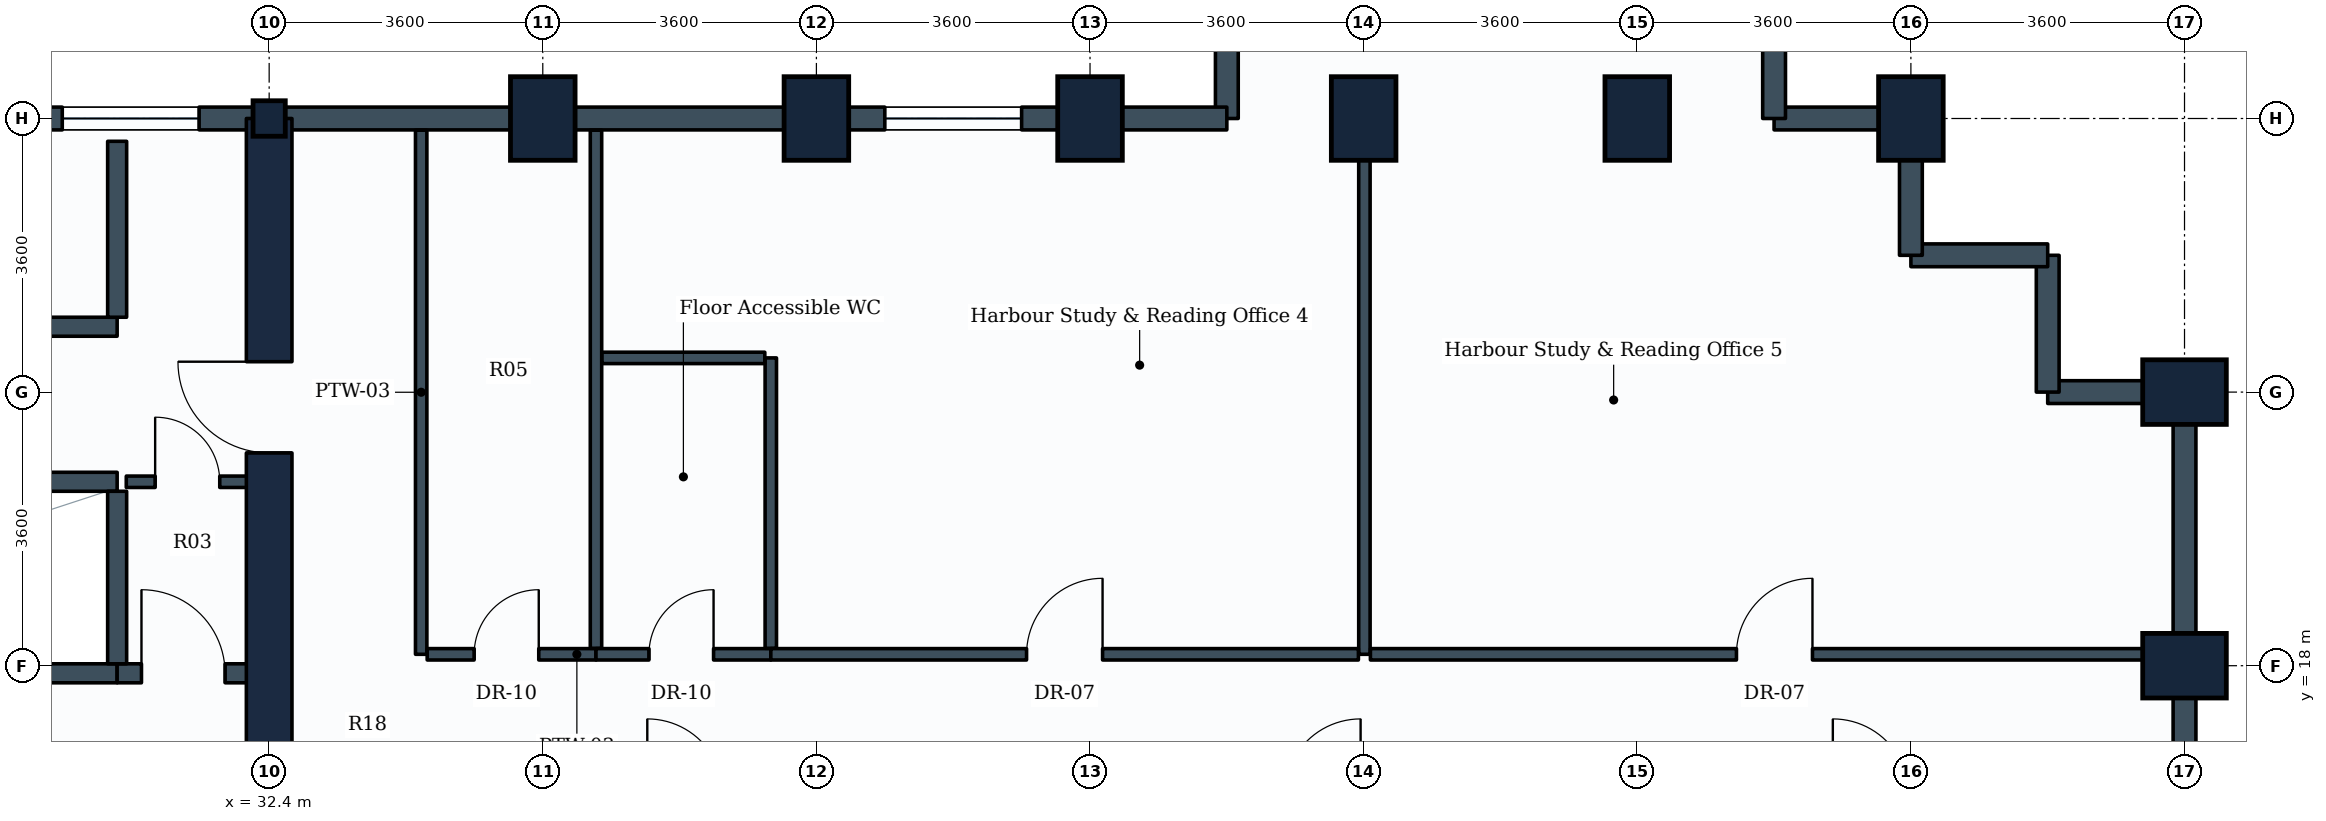
"""IFC4 building model, lengths in metres.
Left out: names, types, materials, properties, quantities, classifications, styles, units other than length and angle.
Written with IfcOpenShell. Run it as: python <this file> out.ifc"""

import sys

from ifc_helpers import new_model, si_unit, direction, frame, frame_2d, origin, origin_2d, place, context, subcontext, project, spatial, rectangle, i_section, extrude, element, fill, save


model = new_model("IFC4")
c1 = context("Model", 3, precision=1e-05, world=origin(), true_north=direction((0.0, 1.0)))
c2 = subcontext(c1, "Body", "Model", "MODEL_VIEW")
j1 = project(units=[si_unit("LENGTHUNIT", "METRE"), si_unit("PLANEANGLEUNIT", "RADIAN")], contexts=[c1])
p1 = place(None, origin())
s1 = spatial("IfcSite", under=j1, at=p1, CompositionType="ELEMENT")
p2 = place(p1, origin())
s2 = spatial("IfcBuilding", under=s1, at=p2, CompositionType="ELEMENT")
p3 = place(p2, frame((0.0, 0.0, 111.3)))
s3 = spatial("IfcBuildingStorey", under=s2, at=p3, CompositionType="ELEMENT", Elevation=111.3)
p4 = place(p3, frame((32.4, 25.2, 0.0), z_axis=(0.0, 0.0, 1.0), x_axis=(1.0, 0.0, 0.0)))
e1 = element("IfcColumn", 1, at=p4, inside=s3, PredefinedType="COLUMN", context=c2, shape_type="SweptSolid", body=[
    extrude(i_section(OverallWidth=0.424, OverallDepth=0.467, WebThickness=0.033, FlangeThickness=0.053, FilletRadius=0.015, at=origin_2d()), origin(), (0.0, 0.0, 1.0), 3.9),
])
for number, where, z_axis, x_axis in (
    (2, (36.0, 25.2, 0.0), (0.0, 0.0, 1.0), (1.0, 0.0, 0.0)),
    (3, (39.6, 25.2, 0.0), (0.0, 0.0, 1.0), (1.0, 0.0, 0.0)),
    (4, (43.2, 25.2, 0.0), (0.0, 0.0, 1.0), (1.0, 0.0, 0.0)),
    (5, (46.8, 25.2, 0.0), (0.0, 0.0, 1.0), (1.0, 0.0, 0.0)),
    (6, (50.4, 25.2, 0.0), (0.0, 0.0, 1.0), (1.0, 0.0, 0.0)),
    (7, (54.0, 25.2, 0.0), (0.0, 0.0, 1.0), (1.0, 0.0, 0.0)),
    (8, (57.6, 18.0, 0.0), (0.0, 0.0, 1.0), (0.0, 1.0, 0.0)),
    (9, (57.6, 21.6, 0.0), (0.0, 0.0, 1.0), (0.0, 1.0, 0.0)),
):
    element("IfcColumn", number, at=place(p3, frame(where, z_axis=z_axis, x_axis=x_axis)), inside=s3, PredefinedType="COLUMN", context=c2, shape_type="SweptSolid", body=[
        extrude(rectangle(XDim=0.85, YDim=1.1, at=origin_2d()), origin(), (0.0, 0.0, 1.0), 3.9),
    ])
for number, where, z_axis, x_axis in (
    (10, (57.6, 18.0, 0.0), (0.0, 0.0, 1.0), (0.0, -1.0, 0.0)),
    (11, (57.6, 21.6, 0.0), (0.0, 0.0, 1.0), (0.0, -1.0, 0.0)),
):
    element("IfcWall", number, at=place(p3, frame(where, z_axis=z_axis, x_axis=x_axis)), inside=s3, PredefinedType="STANDARD", context=c2, shape_type="SweptSolid", body=[
        extrude(rectangle(XDim=3.6, YDim=0.3, at=frame_2d((1.8, 0.0))), origin(), (0.0, 0.0, 1.0), 3.03),
    ])
p5 = place(p3, frame((55.8, 21.6, 0.0), z_axis=(0.0, 0.0, 1.0), x_axis=(1.0, 0.0, 0.0)))
e12 = element("IfcWall", 12, at=p5, inside=s3, PredefinedType="STANDARD", context=c2, shape_type="SweptSolid", body=[
    extrude(rectangle(XDim=1.8, YDim=0.3, at=frame_2d((0.9, 0.0))), origin(), (0.0, 0.0, 1.0), 3.03),
])
p6 = place(p3, frame((55.8, 23.4, 0.0), z_axis=(0.0, 0.0, 1.0), x_axis=(0.0, -1.0, 0.0)))
e13 = element("IfcWall", 13, at=p6, inside=s3, PredefinedType="STANDARD", context=c2, shape_type="SweptSolid", body=[
    extrude(rectangle(XDim=1.8, YDim=0.3, at=frame_2d((0.9, 0.0))), origin(), (0.0, 0.0, 1.0), 3.565),
])
p7 = place(p3, frame((54.0, 23.4, 0.0), z_axis=(0.0, 0.0, 1.0), x_axis=(1.0, 0.0, 0.0)))
e14 = element("IfcWall", 14, at=p7, inside=s3, PredefinedType="STANDARD", context=c2, shape_type="SweptSolid", body=[
    extrude(rectangle(XDim=1.8, YDim=0.3, at=frame_2d((0.9, 0.0))), origin(), (0.0, 0.0, 1.0), 3.565),
])
for number, where, z_axis, x_axis in (
    (15, (54.0, 25.2, 0.0), (0.0, 0.0, 1.0), (0.0, -1.0, 0.0)),
    (16, (52.2, 25.2, 0.0), (0.0, 0.0, 1.0), (1.0, 0.0, 0.0)),
):
    element("IfcWall", number, at=place(p3, frame(where, z_axis=z_axis, x_axis=x_axis)), inside=s3, PredefinedType="STANDARD", context=c2, shape_type="SweptSolid", body=[
        extrude(rectangle(XDim=1.8, YDim=0.3, at=frame_2d((0.9, 0.0))), origin(), (0.0, 0.0, 1.0), 3.03),
    ])
for number, where, z_axis, x_axis in (
    (17, (52.2, 27.3, 0.0), (0.0, 0.0, 1.0), (0.0, -1.0, 0.0)),
    (18, (45.0, 27.3, 0.0), (0.0, 0.0, 1.0), (0.0, -1.0, 0.0)),
):
    element("IfcWall", number, at=place(p3, frame(where, z_axis=z_axis, x_axis=x_axis)), inside=s3, PredefinedType="STANDARD", context=c2, shape_type="SweptSolid", body=[
        extrude(rectangle(XDim=2.1, YDim=0.3, at=frame_2d((1.05, 0.0))), origin(), (0.0, 0.0, 1.0), 3.03),
    ])
p8 = place(p3, frame((43.2, 25.2, 0.0), z_axis=(0.0, 0.0, 1.0), x_axis=(1.0, 0.0, 0.0)))
e19 = element("IfcWall", 19, at=p8, inside=s3, PredefinedType="STANDARD", context=c2, shape_type="SweptSolid", body=[
    extrude(rectangle(XDim=1.8, YDim=0.3, at=frame_2d((0.9, 0.0))), origin(), (0.0, 0.0, 1.0), 3.03),
])
p9 = place(p3, frame((39.6, 25.2, 0.0), z_axis=(0.0, 0.0, 1.0), x_axis=(1.0, 0.0, 0.0)))
e20 = element("IfcWall", 20, at=p9, inside=s3, PredefinedType="STANDARD", context=c2, shape_type="SweptSolid", body=[
    extrude(rectangle(XDim=3.6, YDim=0.3, at=frame_2d((1.8, 0.0))), origin(), (0.0, 0.0, 1.0), 3.03),
])
p10 = place(p9, frame((0.9, 0.0, 0.85)))
e21 = element("IfcOpeningElement", 21, at=p10, cuts=e20, PredefinedType="OPENING", context=c2, shape_type="SweptSolid", body=[
    extrude(rectangle(XDim=1.8, YDim=1.35, at=frame_2d((0.9, 0.675))), frame((0.0, 0.16, 0.0), z_axis=(0.0, -1.0, 0.0), x_axis=(1.0, 0.0, 0.0)), (0.0, 0.0, 1.0), 0.32),
])
for number, where, z_axis, x_axis in (
    (22, (36.0, 25.2, 0.0), (0.0, 0.0, 1.0), (1.0, 0.0, 0.0)),
    (23, (32.4, 25.2, 0.0), (0.0, 0.0, 1.0), (1.0, 0.0, 0.0)),
):
    element("IfcWall", number, at=place(p3, frame(where, z_axis=z_axis, x_axis=x_axis)), inside=s3, PredefinedType="STANDARD", context=c2, shape_type="SweptSolid", body=[
        extrude(rectangle(XDim=3.6, YDim=0.3, at=frame_2d((1.8, 0.0))), origin(), (0.0, 0.0, 1.0), 3.03),
    ])
p11 = place(p3, frame((28.8, 25.2, 0.0), z_axis=(0.0, 0.0, 1.0), x_axis=(1.0, 0.0, 0.0)))
e24 = element("IfcWall", 24, at=p11, inside=s3, PredefinedType="STANDARD", context=c2, shape_type="SweptSolid", body=[
    extrude(rectangle(XDim=3.6, YDim=0.3, at=frame_2d((1.8, 0.0))), origin(), (0.0, 0.0, 1.0), 3.565),
])
p12 = place(p11, frame((0.878, 0.0, 0.85)))
e25 = element("IfcOpeningElement", 25, at=p12, cuts=e24, PredefinedType="OPENING", context=c2, shape_type="SweptSolid", body=[
    extrude(rectangle(XDim=1.8, YDim=1.35, at=frame_2d((0.9, 0.675))), frame((0.0, 0.16, 0.0), z_axis=(0.0, -1.0, 0.0), x_axis=(1.0, 0.0, 0.0)), (0.0, 0.0, 1.0), 0.32),
])
p13 = place(p3, frame((32.4, 10.8, 0.0), z_axis=(0.0, 0.0, 1.0), x_axis=(0.0, 1.0, 0.0)))
e26 = element("IfcWall", 26, at=p13, inside=s3, PredefinedType="SHEAR", context=c2, shape_type="SweptSolid", body=[
    extrude(rectangle(XDim=14.4, YDim=0.6, at=frame_2d((7.2, 0.0))), origin(), (0.0, 0.0, 1.0), 3.58),
])
p14 = place(p13, frame((4.35, 0.0, 0.0)))
e27 = element("IfcOpeningElement", 27, at=p14, cuts=e26, PredefinedType="OPENING", context=c2, shape_type="SweptSolid", body=[
    extrude(rectangle(XDim=1.2, YDim=2.1, at=frame_2d((0.6, 1.05))), frame((0.0, 0.31, 0.0), z_axis=(0.0, -1.0, 0.0), x_axis=(1.0, 0.0, 0.0)), (0.0, 0.0, 1.0), 0.62),
])
p15 = place(p13, frame((10.0, 0.0, 0.0)))
e28 = element("IfcOpeningElement", 28, at=p15, cuts=e26, PredefinedType="OPENING", context=c2, shape_type="SweptSolid", body=[
    extrude(rectangle(XDim=1.2, YDim=2.1, at=frame_2d((0.6, 1.05))), frame((0.0, 0.31, 0.0), z_axis=(0.0, -1.0, 0.0), x_axis=(1.0, 0.0, 0.0)), (0.0, 0.0, 1.0), 0.62),
])
p16 = place(p3, frame((21.88, 17.9, 0.0), z_axis=(0.0, 0.0, 1.0), x_axis=(1.0, 0.0, 0.0)))
e29 = element("IfcWall", 29, at=p16, inside=s3, PredefinedType="PARTITIONING", context=c2, shape_type="SweptSolid", body=[
    extrude(rectangle(XDim=8.52, YDim=0.25, at=frame_2d((4.26, 0.0))), origin(), (0.0, 0.0, 1.0), 3.565),
])
p17 = place(p3, frame((30.4, 17.9, 0.0), z_axis=(0.0, 0.0, 1.0), x_axis=(1.0, 0.0, 0.0)))
e30 = element("IfcWall", 30, at=p17, inside=s3, PredefinedType="PARTITIONING", context=c2, shape_type="SweptSolid", body=[
    extrude(rectangle(XDim=1.75, YDim=0.25, at=frame_2d((0.875, 0.0))), origin(), (0.0, 0.0, 1.0), 3.565),
])
p18 = place(p17, frame((0.32, 0.0, 0.0)))
e31 = element("IfcOpeningElement", 31, at=p18, cuts=e30, PredefinedType="OPENING", context=c2, shape_type="SweptSolid", body=[
    extrude(rectangle(XDim=1.1, YDim=2.1, at=frame_2d((0.55, 1.05))), frame((0.0, 0.135, 0.0), z_axis=(0.0, -1.0, 0.0), x_axis=(1.0, 0.0, 0.0)), (0.0, 0.0, 1.0), 0.27),
])
p19 = place(p3, frame((23.18, 20.42, 0.0), z_axis=(0.0, 0.0, 1.0), x_axis=(1.0, 0.0, 0.0)))
e32 = element("IfcWall", 32, at=p19, inside=s3, PredefinedType="PARTITIONING", context=c2, shape_type="SweptSolid", body=[
    extrude(rectangle(XDim=7.22, YDim=0.25, at=frame_2d((3.61, 0.0))), origin(), (0.0, 0.0, 1.0), 3.565),
])
p20 = place(p3, frame((30.4, 18.025, 0.0), z_axis=(0.0, 0.0, 1.0), x_axis=(0.0, 1.0, 0.0)))
e33 = element("IfcWall", 33, at=p20, inside=s3, PredefinedType="PARTITIONING", context=c2, shape_type="SweptSolid", body=[
    extrude(rectangle(XDim=2.27, YDim=0.25, at=frame_2d((1.135, 0.0))), origin(), (0.0, 0.0, 1.0), 3.565),
])
p21 = place(p3, frame((23.18, 22.46, 0.0), z_axis=(0.0, 0.0, 1.0), x_axis=(1.0, 0.0, 0.0)))
e34 = element("IfcWall", 34, at=p21, inside=s3, PredefinedType="PARTITIONING", context=c2, shape_type="SweptSolid", body=[
    extrude(rectangle(XDim=7.22, YDim=0.25, at=frame_2d((3.61, 0.0))), origin(), (0.0, 0.0, 1.0), 3.565),
])
p22 = place(p3, frame((30.4, 22.585, 0.0), z_axis=(0.0, 0.0, 1.0), x_axis=(0.0, 1.0, 0.0)))
e35 = element("IfcWall", 35, at=p22, inside=s3, PredefinedType="PARTITIONING", context=c2, shape_type="SweptSolid", body=[
    extrude(rectangle(XDim=2.315, YDim=0.25, at=frame_2d((1.157, 0.0))), origin(), (0.0, 0.0, 1.0), 3.565),
])
p23 = place(p3, frame((30.52, 20.42, 0.0), z_axis=(0.0, 0.0, 1.0), x_axis=(1.0, 0.0, 0.0)))
e36 = element("IfcWall", 36, at=p23, inside=s3, PredefinedType="PARTITIONING", context=c2, shape_type="SweptSolid", body=[
    extrude(rectangle(XDim=1.63, YDim=0.15, at=frame_2d((0.815, 0.0))), origin(), (0.0, 0.0, 1.0), 3.565),
])
p24 = place(p23, frame((0.38, 0.0, 0.0)))
e37 = element("IfcOpeningElement", 37, at=p24, cuts=e36, PredefinedType="OPENING", context=c2, shape_type="SweptSolid", body=[
    extrude(rectangle(XDim=0.85, YDim=2.1, at=frame_2d((0.425, 1.05))), frame((0.0, 0.085, 0.0), z_axis=(0.0, -1.0, 0.0), x_axis=(1.0, 0.0, 0.0)), (0.0, 0.0, 1.0), 0.17),
])
p25 = place(p3, frame((34.4, 18.15, 0.0), z_axis=(0.0, 0.0, 1.0), x_axis=(0.0, 1.0, 0.0)))
e38 = element("IfcWall", 38, at=p25, inside=s3, PredefinedType="PARTITIONING", context=c2, shape_type="SweptSolid", body=[
    extrude(rectangle(XDim=6.896, YDim=0.15, at=frame_2d((3.448, 0.0))), origin(), (0.0, 0.0, 1.0), 3.03),
])
p26 = place(p3, frame((34.479, 18.15, 0.0), z_axis=(0.0, 0.0, 1.0), x_axis=(1.0, 0.0, 0.0)))
e39 = element("IfcWall", 39, at=p26, inside=s3, PredefinedType="PARTITIONING", context=c2, shape_type="SweptSolid", body=[
    extrude(rectangle(XDim=2.221, YDim=0.15, at=frame_2d((1.11, 0.0))), origin(), (0.0, 0.0, 1.0), 3.11),
])
p27 = place(p26, frame((0.618, 0.0, 0.0)))
e40 = element("IfcOpeningElement", 40, at=p27, cuts=e39, PredefinedType="OPENING", context=c2, shape_type="SweptSolid", body=[
    extrude(rectangle(XDim=0.85, YDim=2.1, at=frame_2d((0.425, 1.05))), frame((0.0, 0.085, 0.0), z_axis=(0.0, -1.0, 0.0), x_axis=(1.0, 0.0, 0.0)), (0.0, 0.0, 1.0), 0.17),
])
p28 = place(p3, frame((36.7, 18.229, 0.0), z_axis=(0.0, 0.0, 1.0), x_axis=(0.0, 1.0, 0.0)))
e41 = element("IfcWall", 41, at=p28, inside=s3, PredefinedType="PARTITIONING", context=c2, shape_type="SweptSolid", body=[
    extrude(rectangle(XDim=6.817, YDim=0.15, at=frame_2d((3.408, 0.0))), origin(), (0.0, 0.0, 1.0), 3.03),
])
p29 = place(p3, frame((36.7, 18.15, 0.0), z_axis=(0.0, 0.0, 1.0), x_axis=(1.0, 0.0, 0.0)))
e42 = element("IfcWall", 42, at=p29, inside=s3, PredefinedType="PARTITIONING", context=c2, shape_type="SweptSolid", body=[
    extrude(rectangle(XDim=2.3, YDim=0.15, at=frame_2d((1.15, 0.0))), origin(), (0.0, 0.0, 1.0), 3.2),
])
p30 = place(p29, frame((0.697, 0.0, 0.0)))
e43 = element("IfcOpeningElement", 43, at=p30, cuts=e42, PredefinedType="OPENING", context=c2, shape_type="SweptSolid", body=[
    extrude(rectangle(XDim=0.85, YDim=2.1, at=frame_2d((0.425, 1.05))), frame((0.0, 0.085, 0.0), z_axis=(0.0, -1.0, 0.0), x_axis=(1.0, 0.0, 0.0)), (0.0, 0.0, 1.0), 0.17),
])
p31 = place(p3, frame((39.0, 18.229, 0.0), z_axis=(0.0, 0.0, 1.0), x_axis=(0.0, 1.0, 0.0)))
e44 = element("IfcWall", 44, at=p31, inside=s3, PredefinedType="PARTITIONING", context=c2, shape_type="SweptSolid", body=[
    extrude(rectangle(XDim=3.821, YDim=0.15, at=frame_2d((1.911, 0.0))), origin(), (0.0, 0.0, 1.0), 3.11),
])
p32 = place(p3, frame((36.779, 22.05, 0.0), z_axis=(0.0, 0.0, 1.0), x_axis=(1.0, 0.0, 0.0)))
e45 = element("IfcWall", 45, at=p32, inside=s3, PredefinedType="PARTITIONING", context=c2, shape_type="SweptSolid", body=[
    extrude(rectangle(XDim=2.142, YDim=0.15, at=frame_2d((1.071, 0.0))), origin(), (0.0, 0.0, 1.0), 3.565),
])
p33 = place(p3, frame((46.81, 18.15, 0.0), z_axis=(0.0, 0.0, 1.0), x_axis=(0.0, 1.0, 0.0)))
e46 = element("IfcWall", 46, at=p33, inside=s3, PredefinedType="PARTITIONING", context=c2, shape_type="SweptSolid", body=[
    extrude(rectangle(XDim=7.05, YDim=0.15, at=frame_2d((3.525, 0.0))), origin(), (0.0, 0.0, 1.0), 3.12),
])
p34 = place(p3, frame((39.0, 18.15, 0.0), z_axis=(0.0, 0.0, 1.0), x_axis=(1.0, 0.0, 0.0)))
e47 = element("IfcWall", 47, at=p34, inside=s3, PredefinedType="PARTITIONING", context=c2, shape_type="SweptSolid", body=[
    extrude(rectangle(XDim=7.731, YDim=0.15, at=frame_2d((3.865, 0.0))), origin(), (0.0, 0.0, 1.0), 3.11),
])
p35 = place(p34, frame((3.365, 0.0, 0.0)))
e48 = element("IfcOpeningElement", 48, at=p35, cuts=e47, PredefinedType="OPENING", context=c2, shape_type="SweptSolid", body=[
    extrude(rectangle(XDim=1.0, YDim=2.1, at=frame_2d((0.5, 1.05))), frame((0.0, 0.085, 0.0), z_axis=(0.0, -1.0, 0.0), x_axis=(1.0, 0.0, 0.0)), (0.0, 0.0, 1.0), 0.17),
])
p36 = place(p3, frame((46.889, 18.15, 0.0), z_axis=(0.0, 0.0, 1.0), x_axis=(1.0, 0.0, 0.0)))
e49 = element("IfcWall", 49, at=p36, inside=s3, PredefinedType="PARTITIONING", context=c2, shape_type="SweptSolid", body=[
    extrude(rectangle(XDim=10.557, YDim=0.15, at=frame_2d((5.279, 0.0))), origin(), (0.0, 0.0, 1.0), 3.03),
])
p37 = place(p36, frame((4.816, 0.0, 0.0)))
e50 = element("IfcOpeningElement", 50, at=p37, cuts=e49, PredefinedType="OPENING", context=c2, shape_type="SweptSolid", body=[
    extrude(rectangle(XDim=1.0, YDim=2.1, at=frame_2d((0.5, 1.05))), frame((0.0, 0.085, 0.0), z_axis=(0.0, -1.0, 0.0), x_axis=(1.0, 0.0, 0.0)), (0.0, 0.0, 1.0), 0.17),
])
p38 = place(p10, origin())
e51 = element("IfcWindow", 51, at=p38, inside=s3, PartitioningType="SINGLE_PANEL", PredefinedType="WINDOW", context=c2, shape_type="SweptSolid", body=[
    extrude(rectangle(XDim=1.8, YDim=1.35, at=frame_2d((0.9, 0.675))), frame((0.0, 0.03, 0.0), z_axis=(0.0, -1.0, 0.0), x_axis=(1.0, 0.0, 0.0)), (0.0, 0.0, 1.0), 0.06),
])
fill(e21, e51)
p39 = place(p12, origin())
e52 = element("IfcWindow", 52, at=p39, inside=s3, PartitioningType="SINGLE_PANEL", PredefinedType="WINDOW", context=c2, shape_type="SweptSolid", body=[
    extrude(rectangle(XDim=1.8, YDim=1.35, at=frame_2d((0.9, 0.675))), frame((0.0, 0.03, 0.0), z_axis=(0.0, -1.0, 0.0), x_axis=(1.0, 0.0, 0.0)), (0.0, 0.0, 1.0), 0.06),
])
fill(e25, e52)
p40 = place(p18, origin())
e53 = element("IfcDoor", 53, at=p40, inside=s3, OperationType="SINGLE_SWING_LEFT", PredefinedType="DOOR", context=c2, shape_type="SweptSolid", body=[
    extrude(rectangle(XDim=1.1, YDim=2.1, at=frame_2d((0.55, 1.05))), frame((0.0, 0.025, 0.0), z_axis=(0.0, -1.0, 0.0), x_axis=(1.0, 0.0, 0.0)), (0.0, 0.0, 1.0), 0.05),
])
fill(e31, e53)
p41 = place(p15, origin())
e54 = element("IfcDoor", 54, at=p41, inside=s3, OperationType="SINGLE_SWING_RIGHT", PredefinedType="DOOR", context=c2, shape_type="SweptSolid", body=[
    extrude(rectangle(XDim=1.2, YDim=2.1, at=frame_2d((0.6, 1.05))), frame((0.0, 0.025, 0.0), z_axis=(0.0, -1.0, 0.0), x_axis=(1.0, 0.0, 0.0)), (0.0, 0.0, 1.0), 0.05),
])
fill(e28, e54)
p42 = place(p24, origin())
e55 = element("IfcDoor", 55, at=p42, inside=s3, OperationType="SINGLE_SWING_LEFT", PredefinedType="DOOR", context=c2, shape_type="SweptSolid", body=[
    extrude(rectangle(XDim=0.85, YDim=2.1, at=frame_2d((0.425, 1.05))), frame((0.0, 0.025, 0.0), z_axis=(0.0, -1.0, 0.0), x_axis=(1.0, 0.0, 0.0)), (0.0, 0.0, 1.0), 0.05),
])
fill(e37, e55)
p43 = place(p27, origin())
e56 = element("IfcDoor", 56, at=p43, inside=s3, OperationType="SINGLE_SWING_RIGHT", PredefinedType="DOOR", context=c2, shape_type="SweptSolid", body=[
    extrude(rectangle(XDim=0.85, YDim=2.1, at=frame_2d((0.425, 1.05))), frame((0.0, 0.025, 0.0), z_axis=(0.0, -1.0, 0.0), x_axis=(1.0, 0.0, 0.0)), (0.0, 0.0, 1.0), 0.05),
])
fill(e40, e56)
p44 = place(p30, origin())
e57 = element("IfcDoor", 57, at=p44, inside=s3, OperationType="SINGLE_SWING_RIGHT", PredefinedType="DOOR", context=c2, shape_type="SweptSolid", body=[
    extrude(rectangle(XDim=0.85, YDim=2.1, at=frame_2d((0.425, 1.05))), frame((0.0, 0.025, 0.0), z_axis=(0.0, -1.0, 0.0), x_axis=(1.0, 0.0, 0.0)), (0.0, 0.0, 1.0), 0.05),
])
fill(e43, e57)
p45 = place(p35, origin())
e58 = element("IfcDoor", 58, at=p45, inside=s3, OperationType="SINGLE_SWING_RIGHT", PredefinedType="DOOR", context=c2, shape_type="SweptSolid", body=[
    extrude(rectangle(XDim=1.0, YDim=2.1, at=frame_2d((0.5, 1.05))), frame((0.0, 0.025, 0.0), z_axis=(0.0, -1.0, 0.0), x_axis=(1.0, 0.0, 0.0)), (0.0, 0.0, 1.0), 0.05),
])
fill(e48, e58)
p46 = place(p37, origin())
e59 = element("IfcDoor", 59, at=p46, inside=s3, OperationType="SINGLE_SWING_RIGHT", PredefinedType="DOOR", context=c2, shape_type="SweptSolid", body=[
    extrude(rectangle(XDim=1.0, YDim=2.1, at=frame_2d((0.5, 1.05))), frame((0.0, 0.025, 0.0), z_axis=(0.0, -1.0, 0.0), x_axis=(1.0, 0.0, 0.0)), (0.0, 0.0, 1.0), 0.05),
])
fill(e50, e59)
save(model, sys.argv[1])
